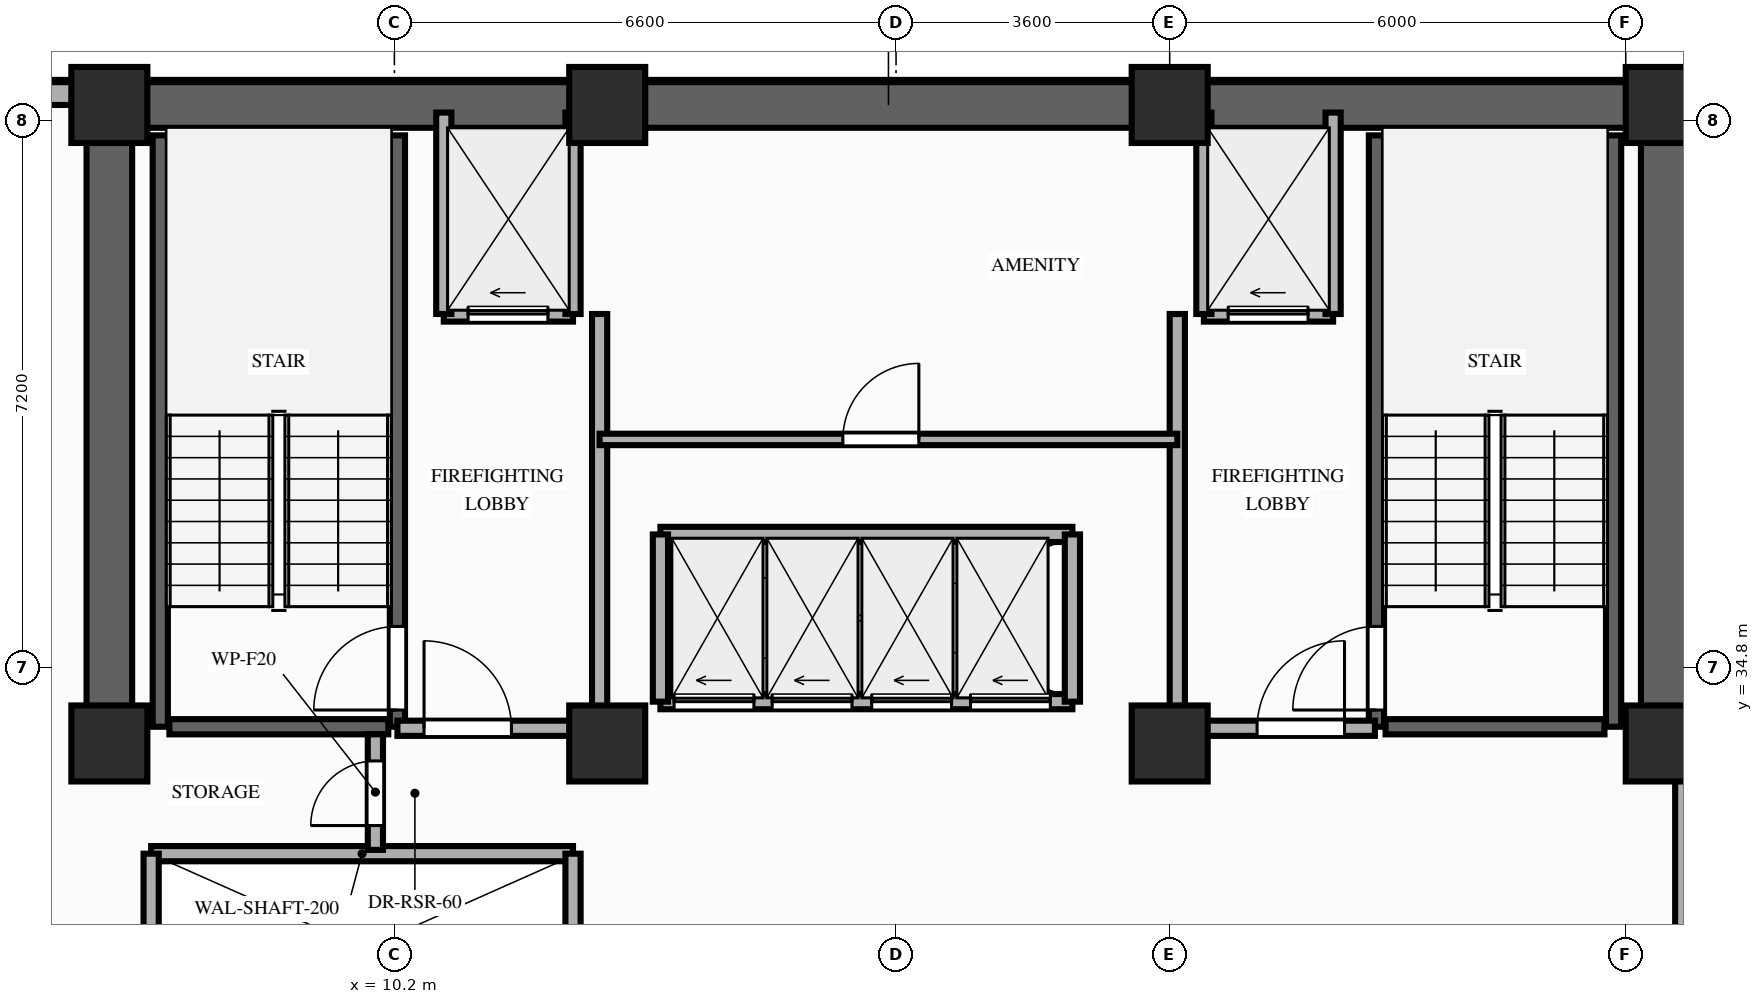
"""IFC4 building model, lengths in metres.
Left out: names, types, materials, properties, quantities, classifications, styles, units other than length and angle.
Written with IfcOpenShell. Run it as: python <this file> out.ifc"""

import sys

from ifc_helpers import new_model, si_unit, direction, frame, frame_2d, origin, origin_2d, place, context, subcontext, project, spatial, rectangle, extrude, element, fill, save


model = new_model("IFC4")
c1 = context("Model", 3, precision=1e-05, world=origin(), true_north=direction((0.0, 1.0)))
c2 = subcontext(c1, "Body", "Model", "MODEL_VIEW")
j1 = project(units=[si_unit("LENGTHUNIT", "METRE"), si_unit("PLANEANGLEUNIT", "RADIAN")], contexts=[c1])
p1 = place(None, origin())
s1 = spatial("IfcSite", under=j1, at=p1, CompositionType="ELEMENT")
p2 = place(p1, origin())
s2 = spatial("IfcBuilding", under=s1, at=p2, CompositionType="ELEMENT")
p3 = place(p2, frame((0.0, 0.0, 136.2)))
s3 = spatial("IfcBuildingStorey", under=s2, at=p3, CompositionType="ELEMENT", Elevation=136.2)
for number, where, z_axis, x_axis in (
    (1, (6.45, 33.8, 0.0), (0.0, 0.0, 1.0), (1.0, 0.0, 0.0)),
    (2, (13.0, 33.8, 0.0), (0.0, 0.0, 1.0), (1.0, 0.0, 0.0)),
    (3, (20.4, 33.8, 0.0), (0.0, 0.0, 1.0), (1.0, 0.0, 0.0)),
    (4, (26.9, 33.8, 0.0), (0.0, 0.0, 1.0), (1.0, 0.0, 0.0)),
    (5, (6.45, 42.2, 0.0), (0.0, 0.0, 1.0), (1.0, 0.0, 0.0)),
    (6, (13.0, 42.2, 0.0), (0.0, 0.0, 1.0), (1.0, 0.0, 0.0)),
    (7, (20.4, 42.2, 0.0), (0.0, 0.0, 1.0), (1.0, 0.0, 0.0)),
    (8, (26.9, 42.2, 0.0), (0.0, 0.0, 1.0), (1.0, 0.0, 0.0)),
):
    element("IfcColumn", number, at=place(p3, frame(where, z_axis=z_axis, x_axis=x_axis)), inside=s3, PredefinedType="COLUMN", context=c2, shape_type="SweptSolid", body=[
        extrude(rectangle(XDim=1.0, YDim=1.0, at=origin_2d()), origin(), (0.0, 0.0, 1.0), 3.2),
    ])
p4 = place(p3, frame((6.0, 42.35, 0.0), z_axis=(0.0, 0.0, 1.0), x_axis=(-1.0, 0.0, 0.0)))
e9 = element("IfcWall", 9, at=p4, inside=s3, PredefinedType="STANDARD", context=c2, shape_type="SweptSolid", body=[
    extrude(rectangle(XDim=2.0, YDim=0.3, at=frame_2d((1.0, 0.0))), origin(), (0.0, 0.0, 1.0), 3.02),
])
p5 = place(p3, frame((6.45, 42.2, 0.0), z_axis=(0.0, 0.0, 1.0), x_axis=(1.0, 0.0, 0.0)))
e10 = element("IfcWall", 10, at=p5, inside=s3, PredefinedType="SHEAR", context=c2, shape_type="SweptSolid", body=[
    extrude(rectangle(XDim=20.45, YDim=0.6, at=frame_2d((10.225, 0.0))), origin(), (0.0, 0.0, 1.0), 3.02),
])
for number, where, z_axis, x_axis in (
    (11, (6.45, 33.8, 0.0), (0.0, 0.0, 1.0), (0.0, 1.0, 0.0)),
    (12, (26.9, 33.8, 0.0), (0.0, 0.0, 1.0), (0.0, 1.0, 0.0)),
):
    element("IfcWall", number, at=place(p3, frame(where, z_axis=z_axis, x_axis=x_axis)), inside=s3, PredefinedType="SHEAR", context=c2, shape_type="SweptSolid", body=[
        extrude(rectangle(XDim=7.95, YDim=0.6, at=frame_2d((3.975, 0.0))), origin(), (0.0, 0.0, 1.0), 3.02),
    ])
p6 = place(p3, frame((7.12, 34.02, 0.0), z_axis=(0.0, 0.0, 1.0), x_axis=(0.0, 1.0, 0.0)))
e13 = element("IfcWall", 13, at=p6, inside=s3, PredefinedType="SHEAR", context=c2, shape_type="SweptSolid", body=[
    extrude(rectangle(XDim=7.78, YDim=0.2, at=frame_2d((3.89, 0.0))), origin(), (0.0, 0.0, 1.0), 3.02),
])
p7 = place(p3, frame((10.24, 34.02, 0.0), z_axis=(0.0, 0.0, 1.0), x_axis=(0.0, 1.0, 0.0)))
e14 = element("IfcWall", 14, at=p7, inside=s3, PredefinedType="SHEAR", context=c2, shape_type="SweptSolid", body=[
    extrude(rectangle(XDim=7.78, YDim=0.2, at=frame_2d((3.89, 0.0))), origin(), (0.0, 0.0, 1.0), 3.02),
])
p8 = place(p7, frame((0.22, 0.0, 0.0)))
e15 = element("IfcOpeningElement", 15, at=p8, cuts=e14, PredefinedType="OPENING", context=c2, shape_type="SweptSolid", body=[
    extrude(rectangle(XDim=1.1, YDim=2.15, at=frame_2d((0.55, 1.075))), frame((0.0, 0.11, 0.0), z_axis=(0.0, -1.0, 0.0), x_axis=(1.0, 0.0, 0.0)), (0.0, 0.0, 1.0), 0.22),
])
p9 = place(p3, frame((7.24, 34.02, 0.0), z_axis=(0.0, 0.0, 1.0), x_axis=(1.0, 0.0, 0.0)))
e16 = element("IfcWall", 16, at=p9, inside=s3, PredefinedType="SHEAR", context=c2, shape_type="SweptSolid", body=[
    extrude(rectangle(XDim=2.88, YDim=0.2, at=frame_2d((1.44, 0.0))), origin(), (0.0, 0.0, 1.0), 3.02),
])
p10 = place(p3, frame((23.12, 34.02, 0.0), z_axis=(0.0, 0.0, 1.0), x_axis=(0.0, 1.0, 0.0)))
e17 = element("IfcWall", 17, at=p10, inside=s3, PredefinedType="SHEAR", context=c2, shape_type="SweptSolid", body=[
    extrude(rectangle(XDim=7.78, YDim=0.2, at=frame_2d((3.89, 0.0))), origin(), (0.0, 0.0, 1.0), 3.02),
])
p11 = place(p10, frame((0.22, 0.0, 0.0)))
e18 = element("IfcOpeningElement", 18, at=p11, cuts=e17, PredefinedType="OPENING", context=c2, shape_type="SweptSolid", body=[
    extrude(rectangle(XDim=1.1, YDim=2.15, at=frame_2d((0.55, 1.075))), frame((0.0, 0.11, 0.0), z_axis=(0.0, -1.0, 0.0), x_axis=(1.0, 0.0, 0.0)), (0.0, 0.0, 1.0), 0.22),
])
p12 = place(p3, frame((26.24, 34.02, 0.0), z_axis=(0.0, 0.0, 1.0), x_axis=(0.0, 1.0, 0.0)))
e19 = element("IfcWall", 19, at=p12, inside=s3, PredefinedType="SHEAR", context=c2, shape_type="SweptSolid", body=[
    extrude(rectangle(XDim=7.78, YDim=0.2, at=frame_2d((3.89, 0.0))), origin(), (0.0, 0.0, 1.0), 3.02),
])
p13 = place(p3, frame((23.24, 34.02, 0.0), z_axis=(0.0, 0.0, 1.0), x_axis=(1.0, 0.0, 0.0)))
e20 = element("IfcWall", 20, at=p13, inside=s3, PredefinedType="SHEAR", context=c2, shape_type="SweptSolid", body=[
    extrude(rectangle(XDim=2.88, YDim=0.2, at=frame_2d((1.44, 0.0))), origin(), (0.0, 0.0, 1.0), 3.02),
])
p14 = place(p3, frame((7.0, 32.35, 0.0), z_axis=(0.0, 0.0, 1.0), x_axis=(1.0, 0.0, 0.0)))
e21 = element("IfcWall", 21, at=p14, inside=s3, PredefinedType="MOVABLE", context=c2, shape_type="SweptSolid", body=[
    extrude(rectangle(XDim=5.55, YDim=0.2, at=frame_2d((2.775, 0.0))), origin(), (0.0, 0.0, 1.0), 3.02),
])
for number, where, z_axis, x_axis in (
    (22, (7.0, 29.85, 0.0), (0.0, 0.0, 1.0), (0.0, 1.0, 0.0)),
    (23, (12.55, 29.85, 0.0), (0.0, 0.0, 1.0), (0.0, 1.0, 0.0)),
):
    element("IfcWall", number, at=place(p3, frame(where, z_axis=z_axis, x_axis=x_axis)), inside=s3, PredefinedType="MOVABLE", context=c2, shape_type="SweptSolid", body=[
        extrude(rectangle(XDim=2.5, YDim=0.2, at=frame_2d((1.25, 0.0))), origin(), (0.0, 0.0, 1.0), 3.02),
    ])
p15 = place(p3, frame((10.85, 39.45, 0.0), z_axis=(0.0, 0.0, 1.0), x_axis=(1.0, 0.0, 0.0)))
e24 = element("IfcWall", 24, at=p15, inside=s3, PredefinedType="MOVABLE", context=c2, shape_type="SweptSolid", body=[
    extrude(rectangle(XDim=1.7, YDim=0.2, at=frame_2d((0.85, 0.0))), origin(), (0.0, 0.0, 1.0), 3.02),
])
p16 = place(p15, frame((0.32, 0.0, 0.0)))
e25 = element("IfcOpeningElement", 25, at=p16, cuts=e24, PredefinedType="OPENING", context=c2, shape_type="SweptSolid", body=[
    extrude(rectangle(XDim=1.05, YDim=2.15, at=frame_2d((0.525, 1.075))), frame((0.0, 0.11, 0.0), z_axis=(0.0, -1.0, 0.0), x_axis=(1.0, 0.0, 0.0)), (0.0, 0.0, 1.0), 0.22),
])
p17 = place(p3, frame((20.85, 39.45, 0.0), z_axis=(0.0, 0.0, 1.0), x_axis=(1.0, 0.0, 0.0)))
e26 = element("IfcWall", 26, at=p17, inside=s3, PredefinedType="MOVABLE", context=c2, shape_type="SweptSolid", body=[
    extrude(rectangle(XDim=1.7, YDim=0.2, at=frame_2d((0.85, 0.0))), origin(), (0.0, 0.0, 1.0), 3.02),
])
p18 = place(p17, frame((0.32, 0.0, 0.0)))
e27 = element("IfcOpeningElement", 27, at=p18, cuts=e26, PredefinedType="OPENING", context=c2, shape_type="SweptSolid", body=[
    extrude(rectangle(XDim=1.05, YDim=2.15, at=frame_2d((0.525, 1.075))), frame((0.0, 0.11, 0.0), z_axis=(0.0, -1.0, 0.0), x_axis=(1.0, 0.0, 0.0)), (0.0, 0.0, 1.0), 0.22),
])
for number, where, z_axis, x_axis in (
    (28, (10.85, 39.45, 0.0), (0.0, 0.0, 1.0), (0.0, 1.0, 0.0)),
    (29, (12.55, 39.45, 0.0), (0.0, 0.0, 1.0), (0.0, 1.0, 0.0)),
):
    element("IfcWall", number, at=place(p3, frame(where, z_axis=z_axis, x_axis=x_axis)), inside=s3, PredefinedType="MOVABLE", context=c2, shape_type="SweptSolid", body=[
        extrude(rectangle(XDim=2.65, YDim=0.2, at=frame_2d((1.325, 0.0))), origin(), (0.0, 0.0, 1.0), 2.45),
    ])
p19 = place(p3, frame((12.9, 34.0, 0.0), z_axis=(0.0, 0.0, 1.0), x_axis=(0.0, 1.0, 0.0)))
e30 = element("IfcWall", 30, at=p19, inside=s3, PredefinedType="PARTITIONING", context=c2, shape_type="SweptSolid", body=[
    extrude(rectangle(XDim=5.45, YDim=0.2, at=frame_2d((2.725, 0.0))), origin(), (0.0, 0.0, 1.0), 2.45),
])
p20 = place(p3, frame((10.24, 34.0, 0.0), z_axis=(0.0, 0.0, 1.0), x_axis=(1.0, 0.0, 0.0)))
e31 = element("IfcWall", 31, at=p20, inside=s3, PredefinedType="PARTITIONING", context=c2, shape_type="SweptSolid", body=[
    extrude(rectangle(XDim=2.66, YDim=0.2, at=frame_2d((1.33, 0.0))), origin(), (0.0, 0.0, 1.0), 2.45),
])
p21 = place(p20, frame((0.35, 0.0, 0.0)))
e32 = element("IfcOpeningElement", 32, at=p21, cuts=e31, PredefinedType="OPENING", context=c2, shape_type="SweptSolid", body=[
    extrude(rectangle(XDim=1.15, YDim=2.15, at=frame_2d((0.575, 1.075))), frame((0.0, 0.11, 0.0), z_axis=(0.0, -1.0, 0.0), x_axis=(1.0, 0.0, 0.0)), (0.0, 0.0, 1.0), 0.22),
])
for number, where, z_axis, x_axis in (
    (33, (20.85, 39.45, 0.0), (0.0, 0.0, 1.0), (0.0, 1.0, 0.0)),
    (34, (22.55, 39.45, 0.0), (0.0, 0.0, 1.0), (0.0, 1.0, 0.0)),
):
    element("IfcWall", number, at=place(p3, frame(where, z_axis=z_axis, x_axis=x_axis)), inside=s3, PredefinedType="MOVABLE", context=c2, shape_type="SweptSolid", body=[
        extrude(rectangle(XDim=2.65, YDim=0.2, at=frame_2d((1.325, 0.0))), origin(), (0.0, 0.0, 1.0), 2.45),
    ])
p22 = place(p3, frame((20.5, 34.0, 0.0), z_axis=(0.0, 0.0, 1.0), x_axis=(0.0, 1.0, 0.0)))
e35 = element("IfcWall", 35, at=p22, inside=s3, PredefinedType="PARTITIONING", context=c2, shape_type="SweptSolid", body=[
    extrude(rectangle(XDim=5.45, YDim=0.2, at=frame_2d((2.725, 0.0))), origin(), (0.0, 0.0, 1.0), 2.45),
])
p23 = place(p3, frame((20.5, 34.0, 0.0), z_axis=(0.0, 0.0, 1.0), x_axis=(1.0, 0.0, 0.0)))
e36 = element("IfcWall", 36, at=p23, inside=s3, PredefinedType="PARTITIONING", context=c2, shape_type="SweptSolid", body=[
    extrude(rectangle(XDim=2.6, YDim=0.2, at=frame_2d((1.3, 0.0))), origin(), (0.0, 0.0, 1.0), 2.45),
])
p24 = place(p23, frame((1.05, 0.0, 0.0)))
e37 = element("IfcOpeningElement", 37, at=p24, cuts=e36, PredefinedType="OPENING", context=c2, shape_type="SweptSolid", body=[
    extrude(rectangle(XDim=1.15, YDim=2.15, at=frame_2d((0.575, 1.075))), frame((0.0, 0.11, 0.0), z_axis=(0.0, -1.0, 0.0), x_axis=(1.0, 0.0, 0.0)), (0.0, 0.0, 1.0), 0.22),
])
p25 = place(p3, frame((9.95, 32.4, 0.0), z_axis=(0.0, 0.0, 1.0), x_axis=(0.0, 1.0, 0.0)))
e38 = element("IfcWall", 38, at=p25, inside=s3, PredefinedType="PARTITIONING", context=c2, shape_type="SweptSolid", body=[
    extrude(rectangle(XDim=1.52, YDim=0.2, at=frame_2d((0.76, 0.0))), origin(), (0.0, 0.0, 1.0), 2.45),
])
p26 = place(p25, frame((0.32, 0.0, 0.0)))
e39 = element("IfcOpeningElement", 39, at=p26, cuts=e38, PredefinedType="OPENING", context=c2, shape_type="SweptSolid", body=[
    extrude(rectangle(XDim=0.85, YDim=2.05, at=frame_2d((0.425, 1.025))), frame((0.0, 0.11, 0.0), z_axis=(0.0, -1.0, 0.0), x_axis=(1.0, 0.0, 0.0)), (0.0, 0.0, 1.0), 0.22),
])
p27 = place(p3, frame((12.9, 37.8, 0.0), z_axis=(0.0, 0.0, 1.0), x_axis=(1.0, 0.0, 0.0)))
e40 = element("IfcWall", 40, at=p27, inside=s3, PredefinedType="PARTITIONING", context=c2, shape_type="SweptSolid", body=[
    extrude(rectangle(XDim=7.6, YDim=0.15, at=frame_2d((3.8, 0.0))), origin(), (0.0, 0.0, 1.0), 3.02),
])
p28 = place(p27, frame((3.2, 0.0, 0.0)))
e41 = element("IfcOpeningElement", 41, at=p28, cuts=e40, PredefinedType="OPENING", context=c2, shape_type="SweptSolid", body=[
    extrude(rectangle(XDim=1.0, YDim=2.15, at=frame_2d((0.5, 1.075))), frame((0.0, 0.085, 0.0), z_axis=(0.0, -1.0, 0.0), x_axis=(1.0, 0.0, 0.0)), (0.0, 0.0, 1.0), 0.17),
])
p29 = place(p3, frame((13.7, 34.35, 0.0), z_axis=(0.0, 0.0, 1.0), x_axis=(1.0, 0.0, 0.0)))
e42 = element("IfcWall", 42, at=p29, inside=s3, PredefinedType="MOVABLE", context=c2, shape_type="SweptSolid", body=[
    extrude(rectangle(XDim=5.42, YDim=0.2, at=frame_2d((2.71, 0.0))), origin(), (0.0, 0.0, 1.0), 3.02),
])
p30 = place(p29, frame((0.18, 0.0, 0.0)))
e43 = element("IfcOpeningElement", 43, at=p30, cuts=e42, PredefinedType="OPENING", context=c2, shape_type="SweptSolid", body=[
    extrude(rectangle(XDim=1.05, YDim=2.15, at=frame_2d((0.525, 1.075))), frame((0.0, 0.11, 0.0), z_axis=(0.0, -1.0, 0.0), x_axis=(1.0, 0.0, 0.0)), (0.0, 0.0, 1.0), 0.22),
])
p31 = place(p29, frame((1.47, 0.0, 0.0)))
e44 = element("IfcOpeningElement", 44, at=p31, cuts=e42, PredefinedType="OPENING", context=c2, shape_type="SweptSolid", body=[
    extrude(rectangle(XDim=1.05, YDim=2.15, at=frame_2d((0.525, 1.075))), frame((0.0, 0.11, 0.0), z_axis=(0.0, -1.0, 0.0), x_axis=(1.0, 0.0, 0.0)), (0.0, 0.0, 1.0), 0.22),
])
p32 = place(p29, frame((2.78, 0.0, 0.0)))
e45 = element("IfcOpeningElement", 45, at=p32, cuts=e42, PredefinedType="OPENING", context=c2, shape_type="SweptSolid", body=[
    extrude(rectangle(XDim=1.05, YDim=2.15, at=frame_2d((0.525, 1.075))), frame((0.0, 0.11, 0.0), z_axis=(0.0, -1.0, 0.0), x_axis=(1.0, 0.0, 0.0)), (0.0, 0.0, 1.0), 0.22),
])
p33 = place(p29, frame((4.08, 0.0, 0.0)))
e46 = element("IfcOpeningElement", 46, at=p33, cuts=e42, PredefinedType="OPENING", context=c2, shape_type="SweptSolid", body=[
    extrude(rectangle(XDim=1.05, YDim=2.15, at=frame_2d((0.525, 1.075))), frame((0.0, 0.11, 0.0), z_axis=(0.0, -1.0, 0.0), x_axis=(1.0, 0.0, 0.0)), (0.0, 0.0, 1.0), 0.22),
])
p34 = place(p3, frame((13.7, 36.55, 0.0), z_axis=(0.0, 0.0, 1.0), x_axis=(1.0, 0.0, 0.0)))
e47 = element("IfcWall", 47, at=p34, inside=s3, PredefinedType="MOVABLE", context=c2, shape_type="SweptSolid", body=[
    extrude(rectangle(XDim=5.42, YDim=0.2, at=frame_2d((2.71, 0.0))), origin(), (0.0, 0.0, 1.0), 3.02),
])
for number, where, z_axis, x_axis in (
    (48, (13.7, 34.35, 0.0), (0.0, 0.0, 1.0), (0.0, 1.0, 0.0)),
    (49, (19.12, 34.35, 0.0), (0.0, 0.0, 1.0), (0.0, 1.0, 0.0)),
):
    element("IfcWall", number, at=place(p3, frame(where, z_axis=z_axis, x_axis=x_axis)), inside=s3, PredefinedType="MOVABLE", context=c2, shape_type="SweptSolid", body=[
        extrude(rectangle(XDim=2.2, YDim=0.2, at=frame_2d((1.1, 0.0))), origin(), (0.0, 0.0, 1.0), 3.02),
    ])
p35 = place(p3, frame((27.15, 31.2, 0.0), z_axis=(0.0, 0.0, 1.0), x_axis=(0.0, 1.0, 0.0)))
e50 = element("IfcWall", 50, at=p35, inside=s3, PredefinedType="PARTITIONING", context=c2, shape_type="SweptSolid", body=[
    extrude(rectangle(XDim=2.48, YDim=0.2, at=frame_2d((1.24, 0.0))), origin(), (0.0, 0.0, 1.0), 2.45),
])
p36 = place(p8, origin())
e51 = element("IfcDoor", 51, at=p36, inside=s3, OperationType="SINGLE_SWING_LEFT", PredefinedType="DOOR", context=c2, shape_type="SweptSolid", body=[
    extrude(rectangle(XDim=1.1, YDim=2.15, at=frame_2d((0.55, 1.075))), frame((0.0, 0.025, 0.0), z_axis=(0.0, -1.0, 0.0), x_axis=(1.0, 0.0, 0.0)), (0.0, 0.0, 1.0), 0.05),
])
fill(e15, e51)
p37 = place(p11, origin())
e52 = element("IfcDoor", 52, at=p37, inside=s3, OperationType="SINGLE_SWING_LEFT", PredefinedType="DOOR", context=c2, shape_type="SweptSolid", body=[
    extrude(rectangle(XDim=1.1, YDim=2.15, at=frame_2d((0.55, 1.075))), frame((0.0, 0.025, 0.0), z_axis=(0.0, -1.0, 0.0), x_axis=(1.0, 0.0, 0.0)), (0.0, 0.0, 1.0), 0.05),
])
fill(e18, e52)
p38 = place(p16, origin())
e53 = element("IfcDoor", 53, at=p38, inside=s3, OperationType="SLIDING_TO_LEFT", PredefinedType="DOOR", context=c2, shape_type="SweptSolid", body=[
    extrude(rectangle(XDim=1.05, YDim=2.15, at=frame_2d((0.525, 1.075))), frame((0.0, 0.025, 0.0), z_axis=(0.0, -1.0, 0.0), x_axis=(1.0, 0.0, 0.0)), (0.0, 0.0, 1.0), 0.05),
])
fill(e25, e53)
p39 = place(p18, origin())
e54 = element("IfcDoor", 54, at=p39, inside=s3, OperationType="SLIDING_TO_LEFT", PredefinedType="DOOR", context=c2, shape_type="SweptSolid", body=[
    extrude(rectangle(XDim=1.05, YDim=2.15, at=frame_2d((0.525, 1.075))), frame((0.0, 0.025, 0.0), z_axis=(0.0, -1.0, 0.0), x_axis=(1.0, 0.0, 0.0)), (0.0, 0.0, 1.0), 0.05),
])
fill(e27, e54)
p40 = place(p21, origin())
e55 = element("IfcDoor", 55, at=p40, inside=s3, OperationType="SINGLE_SWING_LEFT", PredefinedType="DOOR", context=c2, shape_type="SweptSolid", body=[
    extrude(rectangle(XDim=1.15, YDim=2.15, at=frame_2d((0.575, 1.075))), frame((0.0, 0.025, 0.0), z_axis=(0.0, -1.0, 0.0), x_axis=(1.0, 0.0, 0.0)), (0.0, 0.0, 1.0), 0.05),
])
fill(e32, e55)
p41 = place(p24, origin())
e56 = element("IfcDoor", 56, at=p41, inside=s3, OperationType="SINGLE_SWING_RIGHT", PredefinedType="DOOR", context=c2, shape_type="SweptSolid", body=[
    extrude(rectangle(XDim=1.15, YDim=2.15, at=frame_2d((0.575, 1.075))), frame((0.0, 0.025, 0.0), z_axis=(0.0, -1.0, 0.0), x_axis=(1.0, 0.0, 0.0)), (0.0, 0.0, 1.0), 0.05),
])
fill(e37, e56)
p42 = place(p26, origin())
e57 = element("IfcDoor", 57, at=p42, inside=s3, OperationType="SINGLE_SWING_LEFT", PredefinedType="DOOR", context=c2, shape_type="SweptSolid", body=[
    extrude(rectangle(XDim=0.85, YDim=2.05, at=frame_2d((0.425, 1.025))), frame((0.0, 0.025, 0.0), z_axis=(0.0, -1.0, 0.0), x_axis=(1.0, 0.0, 0.0)), (0.0, 0.0, 1.0), 0.05),
])
fill(e39, e57)
p43 = place(p28, origin())
e58 = element("IfcDoor", 58, at=p43, inside=s3, OperationType="SINGLE_SWING_RIGHT", PredefinedType="DOOR", context=c2, shape_type="SweptSolid", body=[
    extrude(rectangle(XDim=1.0, YDim=2.15, at=frame_2d((0.5, 1.075))), frame((0.0, 0.025, 0.0), z_axis=(0.0, -1.0, 0.0), x_axis=(1.0, 0.0, 0.0)), (0.0, 0.0, 1.0), 0.05),
])
fill(e41, e58)
p44 = place(p30, origin())
e59 = element("IfcDoor", 59, at=p44, inside=s3, OperationType="SLIDING_TO_LEFT", PredefinedType="DOOR", context=c2, shape_type="SweptSolid", body=[
    extrude(rectangle(XDim=1.05, YDim=2.15, at=frame_2d((0.525, 1.075))), frame((0.0, 0.025, 0.0), z_axis=(0.0, -1.0, 0.0), x_axis=(1.0, 0.0, 0.0)), (0.0, 0.0, 1.0), 0.05),
])
fill(e43, e59)
p45 = place(p31, origin())
e60 = element("IfcDoor", 60, at=p45, inside=s3, OperationType="SLIDING_TO_LEFT", PredefinedType="DOOR", context=c2, shape_type="SweptSolid", body=[
    extrude(rectangle(XDim=1.05, YDim=2.15, at=frame_2d((0.525, 1.075))), frame((0.0, 0.025, 0.0), z_axis=(0.0, -1.0, 0.0), x_axis=(1.0, 0.0, 0.0)), (0.0, 0.0, 1.0), 0.05),
])
fill(e44, e60)
p46 = place(p32, origin())
e61 = element("IfcDoor", 61, at=p46, inside=s3, OperationType="SLIDING_TO_LEFT", PredefinedType="DOOR", context=c2, shape_type="SweptSolid", body=[
    extrude(rectangle(XDim=1.05, YDim=2.15, at=frame_2d((0.525, 1.075))), frame((0.0, 0.025, 0.0), z_axis=(0.0, -1.0, 0.0), x_axis=(1.0, 0.0, 0.0)), (0.0, 0.0, 1.0), 0.05),
])
fill(e45, e61)
p47 = place(p33, origin())
e62 = element("IfcDoor", 62, at=p47, inside=s3, OperationType="SLIDING_TO_LEFT", PredefinedType="DOOR", context=c2, shape_type="SweptSolid", body=[
    extrude(rectangle(XDim=1.05, YDim=2.15, at=frame_2d((0.525, 1.075))), frame((0.0, 0.025, 0.0), z_axis=(0.0, -1.0, 0.0), x_axis=(1.0, 0.0, 0.0)), (0.0, 0.0, 1.0), 0.05),
])
fill(e46, e62)
save(model, sys.argv[1])
